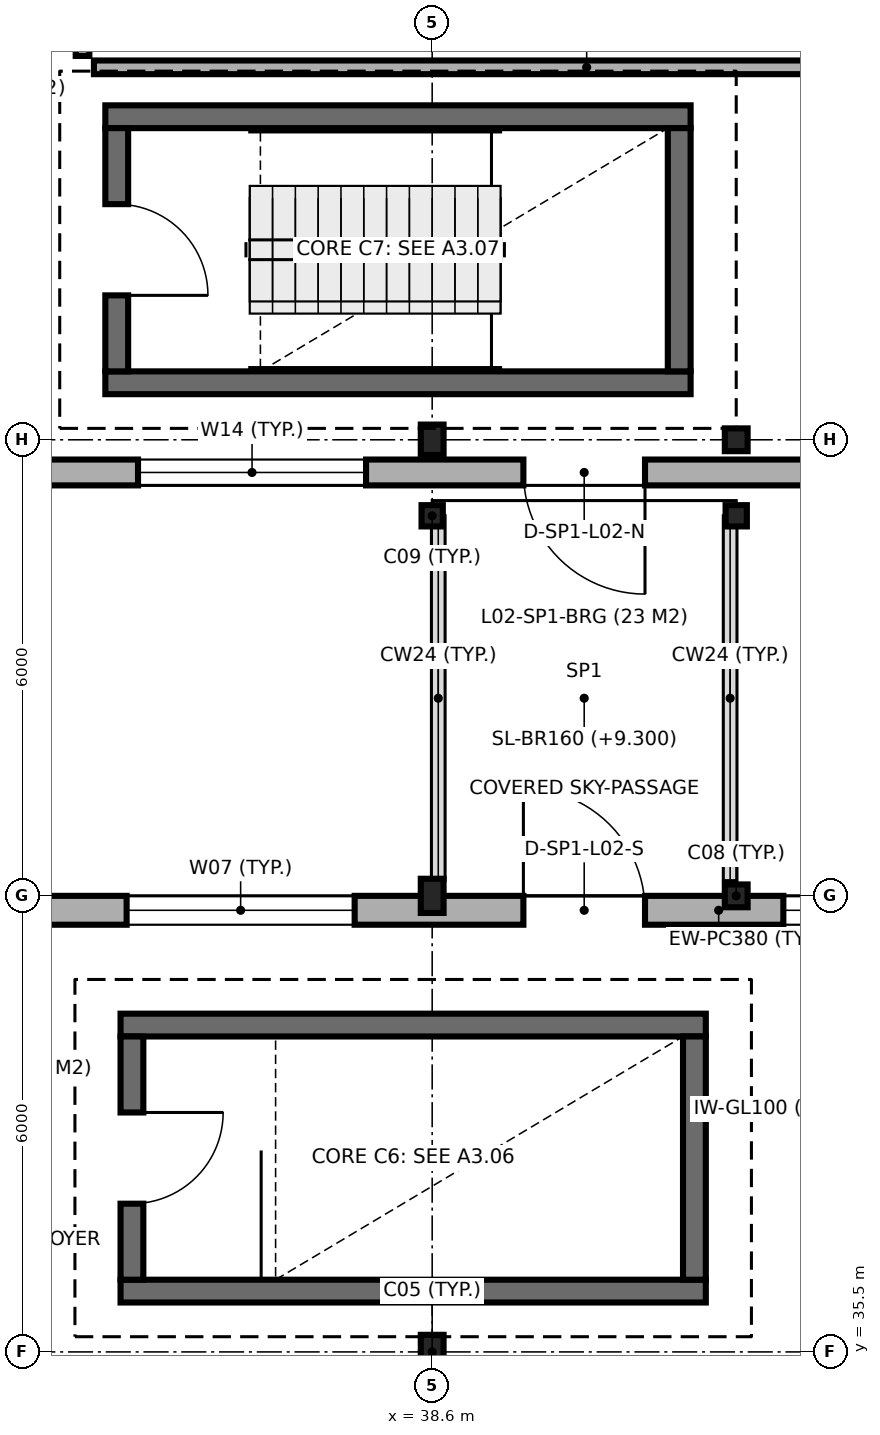
"""IFC4 building model, lengths in metres.
Left out: names, types, materials, properties, quantities, classifications, styles, units other than length and angle.
Written with IfcOpenShell. Run it as: python <this file> out.ifc"""

import sys

from ifc_helpers import new_model, si_unit, direction, frame, frame_2d, origin, origin_2d, place, context, subcontext, project, spatial, rectangle, i_section, extrude, element, fill, save


model = new_model("IFC4")
c1 = context("Model", 3, precision=1e-05, world=origin(), true_north=direction((0.0, 1.0)))
c2 = subcontext(c1, "Body", "Model", "MODEL_VIEW")
j1 = project(units=[si_unit("LENGTHUNIT", "METRE"), si_unit("PLANEANGLEUNIT", "RADIAN")], contexts=[c1])
p1 = place(None, origin())
s1 = spatial("IfcSite", under=j1, at=p1, CompositionType="ELEMENT")
p2 = place(p1, origin())
s2 = spatial("IfcBuilding", under=s1, at=p2, CompositionType="ELEMENT")
p3 = place(p2, frame((0.0, 0.0, 9.3)))
s3 = spatial("IfcBuildingStorey", under=s2, at=p3, CompositionType="ELEMENT", Elevation=9.3)
for number, where, z_axis, x_axis in (
    (1, (38.6, 35.5, 0.0), (0.0, 0.0, 1.0), (1.0, 0.0, 0.0)),
    (2, (38.6, 41.5, 0.0), (0.0, 0.0, 1.0), (1.0, 0.0, 0.0)),
):
    element("IfcColumn", number, at=place(p3, frame(where, z_axis=z_axis, x_axis=x_axis)), inside=s3, PredefinedType="COLUMN", context=c2, shape_type="SweptSolid", body=[
        extrude(i_section(OverallWidth=0.3, OverallDepth=0.45, WebThickness=0.014, FlangeThickness=0.026, FilletRadius=0.027, at=origin_2d()), origin(), (0.0, 0.0, 1.0), 4.5),
    ])
p4 = place(p3, frame((38.6, 46.5, 0.0), z_axis=(0.0, 0.0, 1.0), x_axis=(1.0, 0.0, 0.0)))
e3 = element("IfcColumn", 3, at=p4, inside=s3, PredefinedType="COLUMN", context=c2, shape_type="SweptSolid", body=[
    extrude(i_section(OverallWidth=0.28, OverallDepth=0.28, WebThickness=0.01, FlangeThickness=0.018, FilletRadius=0.024, at=origin_2d()), origin(), (0.0, 0.0, 1.0), 4.5),
])
p5 = place(p3, frame((38.6, 47.5, 0.0), z_axis=(0.0, 0.0, 1.0), x_axis=(1.0, 0.0, 0.0)))
e4 = element("IfcColumn", 4, at=p5, inside=s3, PredefinedType="COLUMN", context=c2, shape_type="SweptSolid", body=[
    extrude(i_section(OverallWidth=0.3, OverallDepth=0.4, WebThickness=0.013, FlangeThickness=0.024, FilletRadius=0.027, at=origin_2d()), origin(), (0.0, 0.0, 1.0), 4.5),
])
p6 = place(p3, frame((42.6, 41.5, 0.0), z_axis=(0.0, 0.0, 1.0), x_axis=(1.0, 0.0, 0.0)))
e5 = element("IfcColumn", 5, at=p6, inside=s3, PredefinedType="COLUMN", context=c2, shape_type="SweptSolid", body=[
    extrude(i_section(OverallWidth=0.3, OverallDepth=0.3, WebThickness=0.011, FlangeThickness=0.019, FilletRadius=0.027, at=origin_2d()), origin(), (0.0, 0.0, 1.0), 4.5),
])
p7 = place(p3, frame((42.6, 46.5, 0.0), z_axis=(0.0, 0.0, 1.0), x_axis=(1.0, 0.0, 0.0)))
e6 = element("IfcColumn", 6, at=p7, inside=s3, PredefinedType="COLUMN", context=c2, shape_type="SweptSolid", body=[
    extrude(i_section(OverallWidth=0.28, OverallDepth=0.28, WebThickness=0.01, FlangeThickness=0.018, FilletRadius=0.024, at=origin_2d()), origin(), (0.0, 0.0, 1.0), 4.5),
])
p8 = place(p3, frame((42.6, 47.5, 0.0), z_axis=(0.0, 0.0, 1.0), x_axis=(1.0, 0.0, 0.0)))
e7 = element("IfcColumn", 7, at=p8, inside=s3, PredefinedType="COLUMN", context=c2, shape_type="SweptSolid", body=[
    extrude(i_section(OverallWidth=0.3, OverallDepth=0.3, WebThickness=0.011, FlangeThickness=0.019, FilletRadius=0.027, at=origin_2d()), origin(), (0.0, 0.0, 1.0), 4.5),
])
for number, where, z_axis, x_axis in (
    (8, (34.5, 36.3, 0.0), (0.0, 0.0, 1.0), (1.0, 0.0, 0.0)),
    (9, (42.2, 39.8, 0.0), (0.0, 0.0, 1.0), (-1.0, 0.0, 0.0)),
):
    element("IfcWall", number, at=place(p3, frame(where, z_axis=z_axis, x_axis=x_axis)), inside=s3, PredefinedType="SHEAR", context=c2, shape_type="SweptSolid", body=[
        extrude(rectangle(XDim=7.7, YDim=0.3, at=frame_2d((3.85, 0.0))), origin(), (0.0, 0.0, 1.0), 4.5),
    ])
p9 = place(p3, frame((34.65, 39.65, 0.0), z_axis=(0.0, 0.0, 1.0), x_axis=(0.0, -1.0, 0.0)))
e10 = element("IfcWall", 10, at=p9, inside=s3, PredefinedType="SHEAR", context=c2, shape_type="SweptSolid", body=[
    extrude(rectangle(XDim=3.2, YDim=0.3, at=frame_2d((1.6, 0.0))), origin(), (0.0, 0.0, 1.0), 4.5),
])
p10 = place(p9, frame((1.0, 0.0, 0.0)))
e11 = element("IfcOpeningElement", 11, at=p10, cuts=e10, PredefinedType="OPENING", context=c2, shape_type="SweptSolid", body=[
    extrude(rectangle(XDim=1.2, YDim=2.15, at=frame_2d((0.6, 1.075))), frame((0.0, 0.16, 0.0), z_axis=(0.0, -1.0, 0.0), x_axis=(1.0, 0.0, 0.0)), (0.0, 0.0, 1.0), 0.32),
])
p11 = place(p3, frame((42.05, 36.45, 0.0), z_axis=(0.0, 0.0, 1.0), x_axis=(0.0, 1.0, 0.0)))
e12 = element("IfcWall", 12, at=p11, inside=s3, PredefinedType="SHEAR", context=c2, shape_type="SweptSolid", body=[
    extrude(rectangle(XDim=3.2, YDim=0.3, at=frame_2d((1.6, 0.0))), origin(), (0.0, 0.0, 1.0), 4.5),
])
for number, where, z_axis, x_axis in (
    (13, (34.3, 48.25, 0.0), (0.0, 0.0, 1.0), (1.0, 0.0, 0.0)),
    (14, (42.0, 51.75, 0.0), (0.0, 0.0, 1.0), (-1.0, 0.0, 0.0)),
):
    element("IfcWall", number, at=place(p3, frame(where, z_axis=z_axis, x_axis=x_axis)), inside=s3, PredefinedType="SHEAR", context=c2, shape_type="SweptSolid", body=[
        extrude(rectangle(XDim=7.7, YDim=0.3, at=frame_2d((3.85, 0.0))), origin(), (0.0, 0.0, 1.0), 4.5),
    ])
p12 = place(p3, frame((34.45, 51.6, 0.0), z_axis=(0.0, 0.0, 1.0), x_axis=(0.0, -1.0, 0.0)))
e15 = element("IfcWall", 15, at=p12, inside=s3, PredefinedType="SHEAR", context=c2, shape_type="SweptSolid", body=[
    extrude(rectangle(XDim=3.2, YDim=0.3, at=frame_2d((1.6, 0.0))), origin(), (0.0, 0.0, 1.0), 4.5),
])
p13 = place(p12, frame((1.0, 0.0, 0.0)))
e16 = element("IfcOpeningElement", 16, at=p13, cuts=e15, PredefinedType="OPENING", context=c2, shape_type="SweptSolid", body=[
    extrude(rectangle(XDim=1.2, YDim=2.15, at=frame_2d((0.6, 1.075))), frame((0.0, 0.16, 0.0), z_axis=(0.0, -1.0, 0.0), x_axis=(1.0, 0.0, 0.0)), (0.0, 0.0, 1.0), 0.32),
])
p14 = place(p3, frame((41.85, 48.4, 0.0), z_axis=(0.0, 0.0, 1.0), x_axis=(0.0, 1.0, 0.0)))
e17 = element("IfcWall", 17, at=p14, inside=s3, PredefinedType="SHEAR", context=c2, shape_type="SweptSolid", body=[
    extrude(rectangle(XDim=3.2, YDim=0.3, at=frame_2d((1.6, 0.0))), origin(), (0.0, 0.0, 1.0), 4.5),
])
p15 = place(p3, frame((54.138, 41.31, 0.0), z_axis=(0.0, 0.0, 1.0), x_axis=(-1.0, 0.0, 0.0)))
e18 = element("IfcWall", 18, at=p15, inside=s3, PredefinedType="SOLIDWALL", context=c2, shape_type="SweptSolid", body=[
    extrude(rectangle(XDim=23.538, YDim=0.38, at=frame_2d((11.769, 0.0))), origin(), (0.0, 0.0, 1.0), 4.25),
])
p16 = place(p15, frame((12.738, 0.0, 0.0)))
e19 = element("IfcOpeningElement", 19, at=p16, cuts=e18, PredefinedType="OPENING", context=c2, shape_type="SweptSolid", body=[
    extrude(rectangle(XDim=1.6, YDim=2.2, at=frame_2d((0.8, 1.1))), frame((0.0, 0.2, 0.0), z_axis=(0.0, -1.0, 0.0), x_axis=(1.0, 0.0, 0.0)), (0.0, 0.0, 1.0), 0.4),
])
p17 = place(p15, frame((3.938, 0.0, 0.9)))
e20 = element("IfcOpeningElement", 20, at=p17, cuts=e18, PredefinedType="OPENING", context=c2, shape_type="SweptSolid", body=[
    extrude(rectangle(XDim=1.2, YDim=1.8, at=frame_2d((0.6, 0.9))), frame((0.0, 0.2, 0.0), z_axis=(0.0, -1.0, 0.0), x_axis=(1.0, 0.0, 0.0)), (0.0, 0.0, 1.0), 0.4),
])
p18 = place(p15, frame((8.258, 0.0, 0.9)))
e21 = element("IfcOpeningElement", 21, at=p18, cuts=e18, PredefinedType="OPENING", context=c2, shape_type="SweptSolid", body=[
    extrude(rectangle(XDim=0.9, YDim=1.8, at=frame_2d((0.45, 0.9))), frame((0.0, 0.2, 0.0), z_axis=(0.0, -1.0, 0.0), x_axis=(1.0, 0.0, 0.0)), (0.0, 0.0, 1.0), 0.4),
])
p19 = place(p15, frame((10.018, 0.0, 0.9)))
e22 = element("IfcOpeningElement", 22, at=p19, cuts=e18, PredefinedType="OPENING", context=c2, shape_type="SweptSolid", body=[
    extrude(rectangle(XDim=0.9, YDim=1.8, at=frame_2d((0.45, 0.9))), frame((0.0, 0.2, 0.0), z_axis=(0.0, -1.0, 0.0), x_axis=(1.0, 0.0, 0.0)), (0.0, 0.0, 1.0), 0.4),
])
p20 = place(p15, frame((16.558, 0.0, 0.9)))
e23 = element("IfcOpeningElement", 23, at=p20, cuts=e18, PredefinedType="OPENING", context=c2, shape_type="SweptSolid", body=[
    extrude(rectangle(XDim=3.0, YDim=1.8, at=frame_2d((1.5, 0.9))), frame((0.0, 0.2, 0.0), z_axis=(0.0, -1.0, 0.0), x_axis=(1.0, 0.0, 0.0)), (0.0, 0.0, 1.0), 0.4),
])
p21 = place(p3, frame((5.922, 47.07, 0.0), z_axis=(0.0, 0.0, 1.0), x_axis=(1.0, 0.0, 0.0)))
e24 = element("IfcWall", 24, at=p21, inside=s3, PredefinedType="SOLIDWALL", context=c2, shape_type="SweptSolid", body=[
    extrude(rectangle(XDim=41.478, YDim=0.34, at=frame_2d((20.739, 0.0))), origin(), (0.0, 0.0, 1.0), 4.25),
])
p22 = place(p21, frame((33.878, 0.0, 0.0)))
e25 = element("IfcOpeningElement", 25, at=p22, cuts=e24, PredefinedType="OPENING", context=c2, shape_type="SweptSolid", body=[
    extrude(rectangle(XDim=1.6, YDim=2.2, at=frame_2d((0.8, 1.1))), frame((0.0, 0.18, 0.0), z_axis=(0.0, -1.0, 0.0), x_axis=(1.0, 0.0, 0.0)), (0.0, 0.0, 1.0), 0.36),
])
p23 = place(p21, frame((3.768, 0.0, 0.9)))
e26 = element("IfcOpeningElement", 26, at=p23, cuts=e24, PredefinedType="OPENING", context=c2, shape_type="SweptSolid", body=[
    extrude(rectangle(XDim=1.8, YDim=2.1, at=frame_2d((0.9, 1.05))), frame((0.0, 0.18, 0.0), z_axis=(0.0, -1.0, 0.0), x_axis=(1.0, 0.0, 0.0)), (0.0, 0.0, 1.0), 0.36),
])
p24 = place(p21, frame((25.608, 0.0, 0.9)))
e27 = element("IfcOpeningElement", 27, at=p24, cuts=e24, PredefinedType="OPENING", context=c2, shape_type="SweptSolid", body=[
    extrude(rectangle(XDim=1.8, YDim=2.1, at=frame_2d((0.9, 1.05))), frame((0.0, 0.18, 0.0), z_axis=(0.0, -1.0, 0.0), x_axis=(1.0, 0.0, 0.0)), (0.0, 0.0, 1.0), 0.36),
])
p25 = place(p21, frame((28.808, 0.0, 0.9)))
e28 = element("IfcOpeningElement", 28, at=p25, cuts=e24, PredefinedType="OPENING", context=c2, shape_type="SweptSolid", body=[
    extrude(rectangle(XDim=3.0, YDim=2.1, at=frame_2d((1.5, 1.05))), frame((0.0, 0.18, 0.0), z_axis=(0.0, -1.0, 0.0), x_axis=(1.0, 0.0, 0.0)), (0.0, 0.0, 1.0), 0.36),
])
p26 = place(p21, frame((37.928, 0.0, 0.9)))
e29 = element("IfcOpeningElement", 29, at=p26, cuts=e24, PredefinedType="OPENING", context=c2, shape_type="SweptSolid", body=[
    extrude(rectangle(XDim=1.5, YDim=1.5, at=frame_2d((0.75, 0.75))), frame((0.0, 0.18, 0.0), z_axis=(0.0, -1.0, 0.0), x_axis=(1.0, 0.0, 0.0)), (0.0, 0.0, 1.0), 0.36),
])
p27 = place(p3, frame((34.15, 52.4, 0.0), z_axis=(0.0, 0.0, 1.0), x_axis=(1.0, 0.0, 0.0)))
e30 = element("IfcWall", 30, at=p27, inside=s3, PredefinedType="PARTITIONING", context=c2, shape_type="SweptSolid", body=[
    extrude(rectangle(XDim=12.965, YDim=0.18, at=frame_2d((6.482, 0.0))), origin(), (0.0, 0.0, 1.0), 4.25),
])
p28 = place(p3, frame((34.0, 52.55, 0.0), z_axis=(0.0, 0.0, 1.0), x_axis=(0.0, 1.0, 0.0)))
e31 = element("IfcWall", 31, at=p28, inside=s3, PredefinedType="PARTITIONING", context=c2, shape_type="SweptSolid", body=[
    extrude(rectangle(XDim=4.77, YDim=0.18, at=frame_2d((2.385, 0.0))), origin(), (0.0, 0.0, 1.0), 4.25),
])
p29 = place(p28, frame((1.652, 0.0, 0.0)))
e32 = element("IfcOpeningElement", 32, at=p29, cuts=e31, PredefinedType="OPENING", context=c2, shape_type="SweptSolid", body=[
    extrude(rectangle(XDim=1.1, YDim=2.15, at=frame_2d((0.55, 1.075))), frame((0.0, 0.1, 0.0), z_axis=(0.0, -1.0, 0.0), x_axis=(1.0, 0.0, 0.0)), (0.0, 0.0, 1.0), 0.2),
])
p30 = place(p10, origin())
e33 = element("IfcDoor", 33, at=p30, inside=s3, OperationType="SINGLE_SWING_LEFT", PredefinedType="DOOR", context=c2, shape_type="SweptSolid", body=[
    extrude(rectangle(XDim=1.2, YDim=2.15, at=frame_2d((0.6, 1.075))), frame((0.0, 0.025, 0.0), z_axis=(0.0, -1.0, 0.0), x_axis=(1.0, 0.0, 0.0)), (0.0, 0.0, 1.0), 0.05),
])
fill(e11, e33)
p31 = place(p13, origin())
e34 = element("IfcDoor", 34, at=p31, inside=s3, OperationType="SINGLE_SWING_RIGHT", PredefinedType="DOOR", context=c2, shape_type="SweptSolid", body=[
    extrude(rectangle(XDim=1.2, YDim=2.15, at=frame_2d((0.6, 1.075))), frame((0.0, 0.025, 0.0), z_axis=(0.0, -1.0, 0.0), x_axis=(1.0, 0.0, 0.0)), (0.0, 0.0, 1.0), 0.05),
])
fill(e16, e34)
p32 = place(p16, frame((1.6, 0.0, 0.0), z_axis=(0.0, 0.0, 1.0), x_axis=(-1.0, 0.0, 0.0)))
e35 = element("IfcDoor", 35, at=p32, inside=s3, OperationType="SINGLE_SWING_RIGHT", PredefinedType="DOOR", context=c2, shape_type="SweptSolid", body=[
    extrude(rectangle(XDim=1.6, YDim=2.2, at=frame_2d((0.8, 1.1))), frame((0.0, 0.025, 0.0), z_axis=(0.0, -1.0, 0.0), x_axis=(1.0, 0.0, 0.0)), (0.0, 0.0, 1.0), 0.05),
])
fill(e19, e35)
p33 = place(p19, origin())
e36 = element("IfcWindow", 36, at=p33, inside=s3, PartitioningType="SINGLE_PANEL", PredefinedType="WINDOW", context=c2, shape_type="SweptSolid", body=[
    extrude(rectangle(XDim=0.9, YDim=1.8, at=frame_2d((0.45, 0.9))), frame((0.0, 0.03, 0.0), z_axis=(0.0, -1.0, 0.0), x_axis=(1.0, 0.0, 0.0)), (0.0, 0.0, 1.0), 0.06),
])
fill(e22, e36)
p34 = place(p20, origin())
e37 = element("IfcWindow", 37, at=p34, inside=s3, PartitioningType="SINGLE_PANEL", PredefinedType="WINDOW", context=c2, shape_type="SweptSolid", body=[
    extrude(rectangle(XDim=3.0, YDim=1.8, at=frame_2d((1.5, 0.9))), frame((0.0, 0.03, 0.0), z_axis=(0.0, -1.0, 0.0), x_axis=(1.0, 0.0, 0.0)), (0.0, 0.0, 1.0), 0.06),
])
fill(e23, e37)
p35 = place(p22, frame((1.6, 0.0, 0.0), z_axis=(0.0, 0.0, 1.0), x_axis=(-1.0, 0.0, 0.0)))
e38 = element("IfcDoor", 38, at=p35, inside=s3, OperationType="SINGLE_SWING_RIGHT", PredefinedType="DOOR", context=c2, shape_type="SweptSolid", body=[
    extrude(rectangle(XDim=1.6, YDim=2.2, at=frame_2d((0.8, 1.1))), frame((0.0, 0.025, 0.0), z_axis=(0.0, -1.0, 0.0), x_axis=(1.0, 0.0, 0.0)), (0.0, 0.0, 1.0), 0.05),
])
fill(e25, e38)
p36 = place(p25, origin())
e39 = element("IfcWindow", 39, at=p36, inside=s3, PartitioningType="SINGLE_PANEL", PredefinedType="WINDOW", context=c2, shape_type="SweptSolid", body=[
    extrude(rectangle(XDim=3.0, YDim=2.1, at=frame_2d((1.5, 1.05))), frame((0.0, 0.03, 0.0), z_axis=(0.0, -1.0, 0.0), x_axis=(1.0, 0.0, 0.0)), (0.0, 0.0, 1.0), 0.06),
])
fill(e28, e39)
save(model, sys.argv[1])
